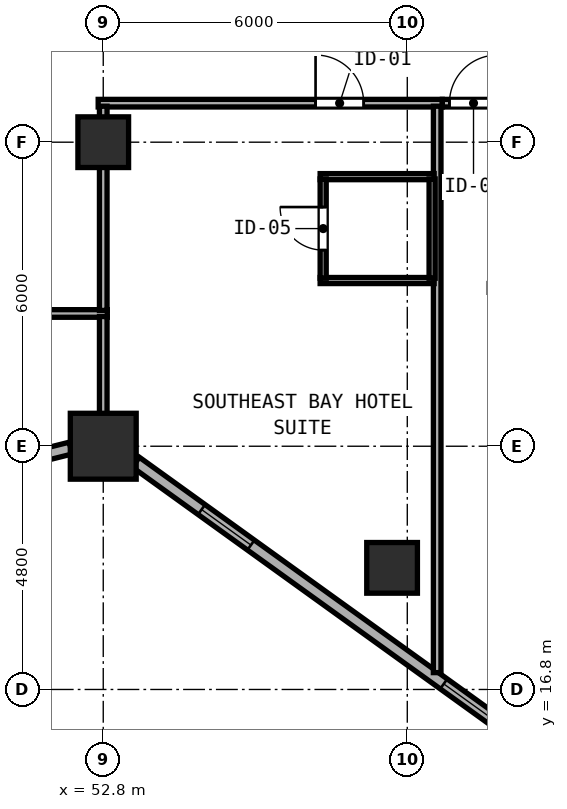
"""IFC4 building model, lengths in metres.
Left out: names, types, materials, properties, quantities, classifications, styles, units other than length and angle.
Written with IfcOpenShell. Run it as: python <this file> out.ifc"""

import sys

from ifc_helpers import new_model, si_unit, direction, frame, frame_2d, origin, origin_2d, place, context, subcontext, project, spatial, rectangle, hollow_rectangle, extrude, element, fill, save


model = new_model("IFC4")
c1 = context("Model", 3, precision=1e-05, world=origin(), true_north=direction((0.0, 1.0)))
c2 = subcontext(c1, "Body", "Model", "MODEL_VIEW")
j1 = project(units=[si_unit("LENGTHUNIT", "METRE"), si_unit("PLANEANGLEUNIT", "RADIAN")], contexts=[c1])
p1 = place(None, origin())
s1 = spatial("IfcSite", under=j1, at=p1, CompositionType="ELEMENT")
p2 = place(p1, origin())
s2 = spatial("IfcBuilding", under=s1, at=p2, CompositionType="ELEMENT")
p3 = place(p2, frame((0.0, 0.0, 31.6)))
s3 = spatial("IfcBuildingStorey", under=s2, at=p3, CompositionType="ELEMENT", Elevation=31.6)
p4 = place(p3, frame((52.8, 21.6, 0.0), z_axis=(0.0, 0.0, 1.0), x_axis=(1.0, 0.0, 0.0)))
e1 = element("IfcColumn", 1, at=p4, inside=s3, PredefinedType="COLUMN", context=c2, shape_type="SweptSolid", body=[
    extrude(hollow_rectangle(XDim=1.3, YDim=1.3, WallThickness=0.048, at=origin_2d()), origin(), (0.0, 0.0, 1.0), 3.8),
])
for number, where, z_axis, x_axis in (
    (2, (52.8, 27.6, 0.0), (0.0, 0.0, 1.0), (1.0, 0.0, 0.0)),
    (3, (58.5, 19.2, 0.0), (0.0, 0.0, 1.0), (1.0, 0.0, 0.0)),
):
    element("IfcColumn", number, at=place(p3, frame(where, z_axis=z_axis, x_axis=x_axis)), inside=s3, PredefinedType="COLUMN", context=c2, shape_type="SweptSolid", body=[
        extrude(hollow_rectangle(XDim=1.0, YDim=1.0, WallThickness=0.038, at=origin_2d()), origin(), (0.0, 0.0, 1.0), 3.8),
    ])
p5 = place(p3, frame((47.932, 20.507, 0.0), z_axis=(0.0, 0.0, 1.0), x_axis=(0.970135906278, 0.242561998982, 0.0)))
e4 = element("IfcWall", 4, at=p5, inside=s3, PredefinedType="SOLIDWALL", context=c2, shape_type="SweptSolid", body=[
    extrude(rectangle(XDim=4.356, YDim=0.24, at=frame_2d((2.178, 0.0))), origin(), (0.0, 0.0, 1.0), 3.097),
])
p6 = place(p5, frame((1.6, 0.0, 0.85)))
e5 = element("IfcOpeningElement", 5, at=p6, cuts=e4, PredefinedType="OPENING", context=c2, shape_type="SweptSolid", body=[
    extrude(rectangle(XDim=1.2, YDim=1.85, at=frame_2d((0.6, 0.925))), frame((0.0, 0.13, 0.0), z_axis=(0.0, -1.0, 0.0), x_axis=(1.0, 0.0, 0.0)), (0.0, 0.0, 1.0), 0.26),
])
p7 = place(p3, frame((53.442, 21.286, 0.0), z_axis=(0.0, 0.0, 1.0), x_axis=(0.811542842993, -0.584292917967, 0.0)))
e6 = element("IfcWall", 6, at=p7, inside=s3, PredefinedType="SOLIDWALL", context=c2, shape_type="SweptSolid", body=[
    extrude(rectangle(XDim=11.438, YDim=0.24, at=frame_2d((5.719, 0.0))), origin(), (0.0, 0.0, 1.0), 3.097),
])
p8 = place(p7, frame((1.6, 0.0, 0.85)))
e7 = element("IfcOpeningElement", 7, at=p8, cuts=e6, PredefinedType="OPENING", context=c2, shape_type="SweptSolid", body=[
    extrude(rectangle(XDim=1.2, YDim=1.85, at=frame_2d((0.6, 0.925))), frame((0.0, 0.13, 0.0), z_axis=(0.0, -1.0, 0.0), x_axis=(1.0, 0.0, 0.0)), (0.0, 0.0, 1.0), 0.26),
])
p9 = place(p7, frame((7.489, 0.0, 0.85)))
e8 = element("IfcOpeningElement", 8, at=p9, cuts=e6, PredefinedType="OPENING", context=c2, shape_type="SweptSolid", body=[
    extrude(rectangle(XDim=1.2, YDim=1.85, at=frame_2d((0.6, 0.925))), frame((0.0, 0.13, 0.0), z_axis=(0.0, -1.0, 0.0), x_axis=(1.0, 0.0, 0.0)), (0.0, 0.0, 1.0), 0.26),
])
p10 = place(p3, frame((45.682, 24.22, 0.0), z_axis=(0.0, 0.0, 1.0), x_axis=(1.0, 0.0, 0.0)))
e9 = element("IfcWall", 9, at=p10, inside=s3, PredefinedType="PARTITIONING", context=c2, shape_type="SweptSolid", body=[
    extrude(rectangle(XDim=7.198, YDim=0.15, at=frame_2d((3.599, 0.0))), origin(), (0.0, 0.0, 1.0), 3.6),
])
p11 = place(p10, frame((2.143, 0.0, 0.0), z_axis=(0.0, 0.0, 1.0), x_axis=(-1.0, 0.0, 0.0)))
e10 = element("IfcOpeningElement", 10, at=p11, cuts=e9, PredefinedType="OPENING", context=c2, shape_type="SweptSolid", body=[
    extrude(rectangle(XDim=0.95, YDim=2.12, at=frame_2d((0.475, 1.06))), frame((0.0, 0.085, 0.0), z_axis=(0.0, -1.0, 0.0), x_axis=(1.0, 0.0, 0.0)), (0.0, 0.0, 1.0), 0.17),
])
p12 = place(p3, frame((52.8, 21.819, 0.0), z_axis=(0.0, 0.0, 1.0), x_axis=(0.0, 1.0, 0.0)))
e11 = element("IfcWall", 11, at=p12, inside=s3, PredefinedType="PARTITIONING", context=c2, shape_type="SweptSolid", body=[
    extrude(rectangle(XDim=2.341, YDim=0.15, at=frame_2d((1.171, 0.0))), origin(), (0.0, 0.0, 1.0), 3.097),
])
p13 = place(p3, frame((52.7, 28.37, 0.0), z_axis=(0.0, 0.0, 1.0), x_axis=(1.0, 0.0, 0.0)))
e12 = element("IfcWall", 12, at=p13, inside=s3, PredefinedType="PARTITIONING", context=c2, shape_type="SweptSolid", body=[
    extrude(rectangle(XDim=6.79, YDim=0.15, at=frame_2d((3.395, 0.0))), origin(), (0.0, 0.0, 1.0), 3.6),
])
p14 = place(p13, frame((5.24, 0.0, 0.0), z_axis=(0.0, 0.0, 1.0), x_axis=(-1.0, 0.0, 0.0)))
e13 = element("IfcOpeningElement", 13, at=p14, cuts=e12, PredefinedType="OPENING", context=c2, shape_type="SweptSolid", body=[
    extrude(rectangle(XDim=0.95, YDim=2.18, at=frame_2d((0.475, 1.09))), frame((0.0, 0.085, 0.0), z_axis=(0.0, -1.0, 0.0), x_axis=(1.0, 0.0, 0.0)), (0.0, 0.0, 1.0), 0.17),
])
p15 = place(p3, frame((52.8, 24.28, 0.0), z_axis=(0.0, 0.0, 1.0), x_axis=(0.0, 1.0, 0.0)))
e14 = element("IfcWall", 14, at=p15, inside=s3, PredefinedType="PARTITIONING", context=c2, shape_type="SweptSolid", body=[
    extrude(rectangle(XDim=4.03, YDim=0.15, at=frame_2d((2.015, 0.0))), origin(), (0.0, 0.0, 1.0), 3.097),
])
p16 = place(p3, frame((59.39, 17.133, 0.0), z_axis=(0.0, 0.0, 1.0), x_axis=(0.0, 1.0, 0.0)))
e15 = element("IfcWall", 15, at=p16, inside=s3, PredefinedType="PARTITIONING", context=c2, shape_type="SweptSolid", body=[
    extrude(rectangle(XDim=11.177, YDim=0.15, at=frame_2d((5.589, 0.0))), origin(), (0.0, 0.0, 1.0), 3.6),
])
p17 = place(p3, frame((57.08, 26.92, 0.0), z_axis=(0.0, 0.0, 1.0), x_axis=(1.0, 0.0, 0.0)))
e16 = element("IfcWall", 16, at=p17, inside=s3, PredefinedType="PARTITIONING", context=c2, shape_type="SweptSolid", body=[
    extrude(rectangle(XDim=2.25, YDim=0.12, at=frame_2d((1.125, 0.0))), origin(), (0.0, 0.0, 1.0), 3.6),
])
p18 = place(p3, frame((57.08, 24.87, 0.0), z_axis=(0.0, 0.0, 1.0), x_axis=(1.0, 0.0, 0.0)))
e17 = element("IfcWall", 17, at=p18, inside=s3, PredefinedType="PARTITIONING", context=c2, shape_type="SweptSolid", body=[
    extrude(rectangle(XDim=2.25, YDim=0.12, at=frame_2d((1.125, 0.0))), origin(), (0.0, 0.0, 1.0), 3.185),
])
p19 = place(p3, frame((57.14, 24.915, 0.0), z_axis=(0.0, 0.0, 1.0), x_axis=(0.0, 1.0, 0.0)))
e18 = element("IfcWall", 18, at=p19, inside=s3, PredefinedType="PARTITIONING", context=c2, shape_type="SweptSolid", body=[
    extrude(rectangle(XDim=1.96, YDim=0.12, at=frame_2d((0.98, 0.0))), origin(), (0.0, 0.0, 1.0), 3.6),
])
p20 = place(p19, frame((1.405, 0.0, 0.0), z_axis=(0.0, 0.0, 1.0), x_axis=(-1.0, 0.0, 0.0)))
e19 = element("IfcOpeningElement", 19, at=p20, cuts=e18, PredefinedType="OPENING", context=c2, shape_type="SweptSolid", body=[
    extrude(rectangle(XDim=0.85, YDim=2.1, at=frame_2d((0.425, 1.05))), frame((0.0, 0.07, 0.0), z_axis=(0.0, -1.0, 0.0), x_axis=(1.0, 0.0, 0.0)), (0.0, 0.0, 1.0), 0.14),
])
p21 = place(p3, frame((59.29, 24.915, 0.0), z_axis=(0.0, 0.0, 1.0), x_axis=(0.0, 1.0, 0.0)))
e20 = element("IfcWall", 20, at=p21, inside=s3, PredefinedType="PARTITIONING", context=c2, shape_type="SweptSolid", body=[
    extrude(rectangle(XDim=1.96, YDim=0.12, at=frame_2d((0.98, 0.0))), origin(), (0.0, 0.0, 1.0), 3.6),
])
p22 = place(p3, frame((59.492, 28.37, 0.0), z_axis=(0.0, 0.0, 1.0), x_axis=(1.0, 0.0, 0.0)))
e21 = element("IfcWall", 21, at=p22, inside=s3, PredefinedType="PARTITIONING", context=c2, shape_type="SweptSolid", body=[
    extrude(rectangle(XDim=5.608, YDim=0.15, at=frame_2d((2.804, 0.0))), origin(), (0.0, 0.0, 1.0), 3.6),
])
p23 = place(p22, frame((1.09, 0.0, 0.0), z_axis=(0.0, 0.0, 1.0), x_axis=(-1.0, 0.0, 0.0)))
e22 = element("IfcOpeningElement", 22, at=p23, cuts=e21, PredefinedType="OPENING", context=c2, shape_type="SweptSolid", body=[
    extrude(rectangle(XDim=0.95, YDim=2.18, at=frame_2d((0.475, 1.09))), frame((0.0, 0.085, 0.0), z_axis=(0.0, -1.0, 0.0), x_axis=(1.0, 0.0, 0.0)), (0.0, 0.0, 1.0), 0.17),
])
p24 = place(p8, origin())
e23 = element("IfcWindow", 23, at=p24, inside=s3, PartitioningType="SINGLE_PANEL", PredefinedType="WINDOW", context=c2, shape_type="SweptSolid", body=[
    extrude(rectangle(XDim=1.2, YDim=1.85, at=frame_2d((0.6, 0.925))), frame((0.0, 0.03, 0.0), z_axis=(0.0, -1.0, 0.0), x_axis=(1.0, 0.0, 0.0)), (0.0, 0.0, 1.0), 0.06),
])
fill(e7, e23)
p25 = place(p9, origin())
e24 = element("IfcWindow", 24, at=p25, inside=s3, PartitioningType="SINGLE_PANEL", PredefinedType="WINDOW", context=c2, shape_type="SweptSolid", body=[
    extrude(rectangle(XDim=1.2, YDim=1.85, at=frame_2d((0.6, 0.925))), frame((0.0, 0.03, 0.0), z_axis=(0.0, -1.0, 0.0), x_axis=(1.0, 0.0, 0.0)), (0.0, 0.0, 1.0), 0.06),
])
fill(e8, e24)
p26 = place(p14, origin())
e25 = element("IfcDoor", 25, at=p26, inside=s3, OperationType="SINGLE_SWING_RIGHT", PredefinedType="DOOR", context=c2, shape_type="SweptSolid", body=[
    extrude(rectangle(XDim=0.95, YDim=2.18, at=frame_2d((0.475, 1.09))), frame((0.0, 0.025, 0.0), z_axis=(0.0, -1.0, 0.0), x_axis=(1.0, 0.0, 0.0)), (0.0, 0.0, 1.0), 0.05),
])
fill(e13, e25)
p27 = place(p20, origin())
e26 = element("IfcDoor", 26, at=p27, inside=s3, OperationType="SINGLE_SWING_LEFT", PredefinedType="DOOR", context=c2, shape_type="SweptSolid", body=[
    extrude(rectangle(XDim=0.85, YDim=2.1, at=frame_2d((0.425, 1.05))), frame((0.0, 0.025, 0.0), z_axis=(0.0, -1.0, 0.0), x_axis=(1.0, 0.0, 0.0)), (0.0, 0.0, 1.0), 0.05),
])
fill(e19, e26)
p28 = place(p23, origin())
e27 = element("IfcDoor", 27, at=p28, inside=s3, OperationType="SINGLE_SWING_LEFT", PredefinedType="DOOR", context=c2, shape_type="SweptSolid", body=[
    extrude(rectangle(XDim=0.95, YDim=2.18, at=frame_2d((0.475, 1.09))), frame((0.0, 0.025, 0.0), z_axis=(0.0, -1.0, 0.0), x_axis=(1.0, 0.0, 0.0)), (0.0, 0.0, 1.0), 0.05),
])
fill(e22, e27)
save(model, sys.argv[1])
